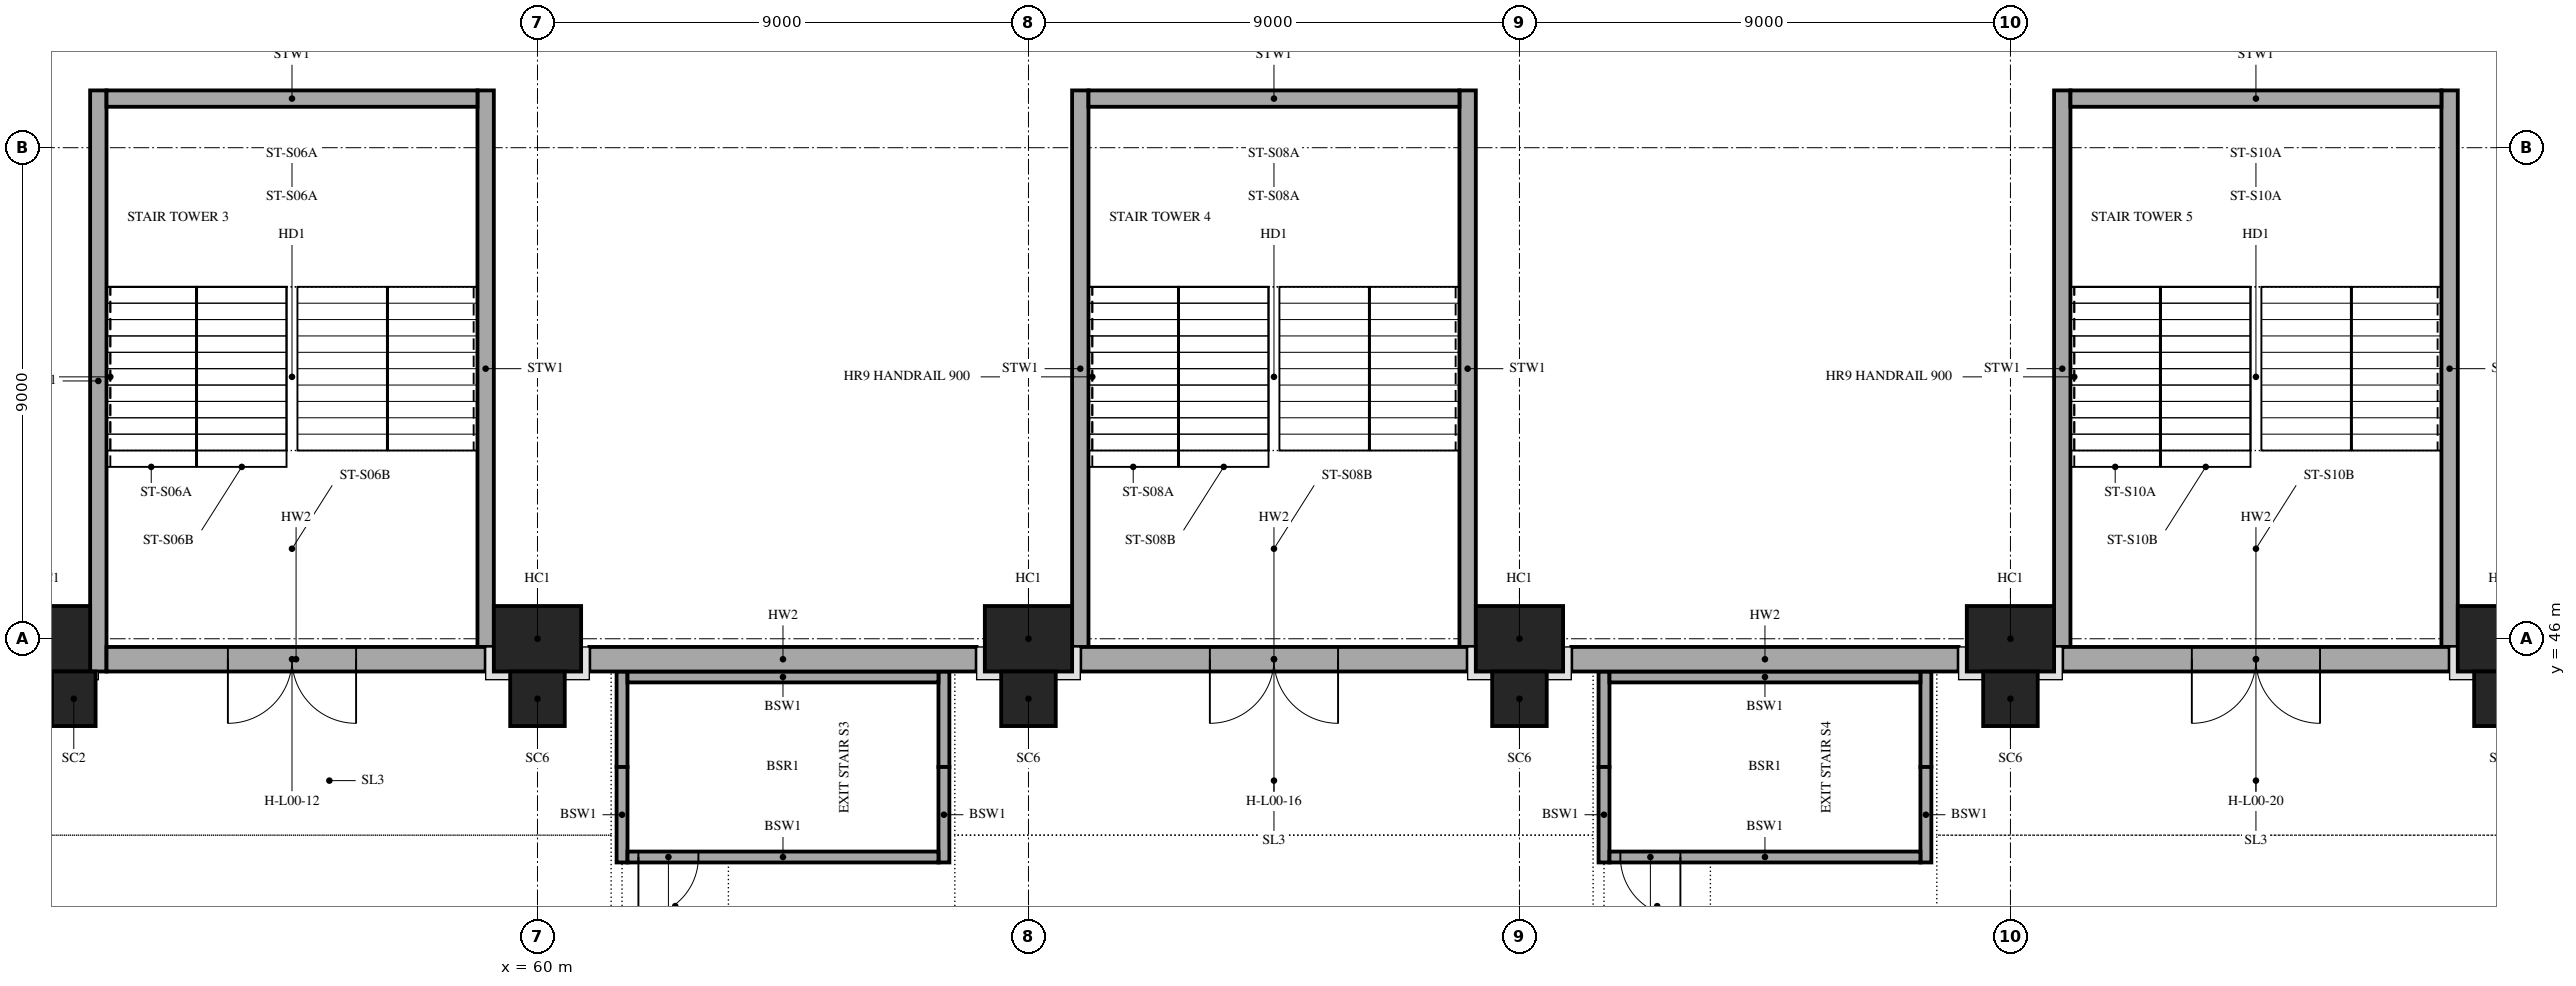
"""IFC4 building model, lengths in metres.
Left out: names, types, materials, properties, quantities, classifications, styles, units other than length and angle.
Written with IfcOpenShell. Run it as: python <this file> out.ifc"""

import sys

from ifc_helpers import new_model, si_unit, direction, frame, frame_2d, origin, origin_2d, place, context, subcontext, project, spatial, rectangle, extrude, element, fill, save


model = new_model("IFC4")
c1 = context("Model", 3, precision=1e-05, world=origin(), true_north=direction((0.0, 1.0)))
c2 = subcontext(c1, "Body", "Model", "MODEL_VIEW")
j1 = project(units=[si_unit("LENGTHUNIT", "METRE"), si_unit("PLANEANGLEUNIT", "RADIAN")], contexts=[c1])
p1 = place(None, origin())
s1 = spatial("IfcSite", under=j1, at=p1, CompositionType="ELEMENT")
p2 = place(p1, origin())
s2 = spatial("IfcBuilding", under=s1, at=p2, CompositionType="ELEMENT")
p3 = place(p2, origin())
s3 = spatial("IfcBuildingStorey", under=s2, at=p3, CompositionType="ELEMENT", Elevation=0.0)
for number, where, z_axis, x_axis in (
    (1, (51.0, 46.0, 0.0), (0.0, 0.0, 1.0), (1.0, 0.0, 0.0)),
    (2, (60.0, 46.0, 0.0), (0.0, 0.0, 1.0), (1.0, 0.0, 0.0)),
    (3, (69.0, 46.0, 0.0), (0.0, 0.0, 1.0), (1.0, 0.0, 0.0)),
    (4, (78.0, 46.0, 0.0), (0.0, 0.0, 1.0), (1.0, 0.0, 0.0)),
    (5, (87.0, 46.0, 0.0), (0.0, 0.0, 1.0), (1.0, 0.0, 0.0)),
    (6, (96.0, 46.0, 0.0), (0.0, 0.0, 1.0), (1.0, 0.0, 0.0)),
):
    element("IfcColumn", number, at=place(p3, frame(where, z_axis=z_axis, x_axis=x_axis)), inside=s3, PredefinedType="COLUMN", context=c2, shape_type="SweptSolid", body=[
        extrude(rectangle(XDim=1.6, YDim=1.2, at=origin_2d()), origin(), (0.0, 0.0, 1.0), 5.0),
    ])
p4 = place(p3, frame((51.95, 45.4, 0.0), z_axis=(0.0, 0.0, 1.0), x_axis=(0.0, 1.0, 0.0)))
e7 = element("IfcWall", 7, at=p4, inside=s3, PredefinedType="SHEAR", context=c2, shape_type="SweptSolid", body=[
    extrude(rectangle(XDim=10.65, YDim=0.3, at=frame_2d((5.325, 0.0))), origin(), (0.0, 0.0, 1.0), 5.0),
])
p5 = place(p3, frame((59.05, 45.85, 0.0), z_axis=(0.0, 0.0, 1.0), x_axis=(0.0, 1.0, 0.0)))
e8 = element("IfcWall", 8, at=p5, inside=s3, PredefinedType="SHEAR", context=c2, shape_type="SweptSolid", body=[
    extrude(rectangle(XDim=10.2, YDim=0.3, at=frame_2d((5.1, 0.0))), origin(), (0.0, 0.0, 1.0), 5.0),
])
p6 = place(p3, frame((52.1, 55.9, 0.0), z_axis=(0.0, 0.0, 1.0), x_axis=(1.0, 0.0, 0.0)))
e9 = element("IfcWall", 9, at=p6, inside=s3, PredefinedType="SHEAR", context=c2, shape_type="SweptSolid", body=[
    extrude(rectangle(XDim=6.8, YDim=0.3, at=frame_2d((3.4, 0.0))), origin(), (0.0, 0.0, 1.0), 5.0),
])
for number, where, z_axis, x_axis in (
    (10, (69.95, 45.85, 0.0), (0.0, 0.0, 1.0), (0.0, 1.0, 0.0)),
    (11, (77.05, 45.85, 0.0), (0.0, 0.0, 1.0), (0.0, 1.0, 0.0)),
):
    element("IfcWall", number, at=place(p3, frame(where, z_axis=z_axis, x_axis=x_axis)), inside=s3, PredefinedType="SHEAR", context=c2, shape_type="SweptSolid", body=[
        extrude(rectangle(XDim=10.2, YDim=0.3, at=frame_2d((5.1, 0.0))), origin(), (0.0, 0.0, 1.0), 5.0),
    ])
p7 = place(p3, frame((70.1, 55.9, 0.0), z_axis=(0.0, 0.0, 1.0), x_axis=(1.0, 0.0, 0.0)))
e12 = element("IfcWall", 12, at=p7, inside=s3, PredefinedType="SHEAR", context=c2, shape_type="SweptSolid", body=[
    extrude(rectangle(XDim=6.8, YDim=0.3, at=frame_2d((3.4, 0.0))), origin(), (0.0, 0.0, 1.0), 5.0),
])
for number, where, z_axis, x_axis in (
    (13, (87.95, 45.85, 0.0), (0.0, 0.0, 1.0), (0.0, 1.0, 0.0)),
    (14, (95.05, 45.85, 0.0), (0.0, 0.0, 1.0), (0.0, 1.0, 0.0)),
):
    element("IfcWall", number, at=place(p3, frame(where, z_axis=z_axis, x_axis=x_axis)), inside=s3, PredefinedType="SHEAR", context=c2, shape_type="SweptSolid", body=[
        extrude(rectangle(XDim=10.2, YDim=0.3, at=frame_2d((5.1, 0.0))), origin(), (0.0, 0.0, 1.0), 5.0),
    ])
p8 = place(p3, frame((88.1, 55.9, 0.0), z_axis=(0.0, 0.0, 1.0), x_axis=(1.0, 0.0, 0.0)))
e15 = element("IfcWall", 15, at=p8, inside=s3, PredefinedType="SHEAR", context=c2, shape_type="SweptSolid", body=[
    extrude(rectangle(XDim=6.8, YDim=0.3, at=frame_2d((3.4, 0.0))), origin(), (0.0, 0.0, 1.0), 5.0),
])
p9 = place(p3, frame((51.5, 44.9, -0.3), z_axis=(0.0, 0.0, 1.0), x_axis=(1.0, 0.0, 0.0)))
e16 = element("IfcColumn", 16, at=p9, inside=s3, PredefinedType="COLUMN", context=c2, shape_type="SweptSolid", body=[
    extrude(rectangle(XDim=0.8, YDim=1.0, at=origin_2d()), origin(), (0.0, 0.0, 1.0), 5.3),
])
for number, where, z_axis, x_axis in (
    (17, (60.0, 44.9, -0.3), (0.0, 0.0, 1.0), (1.0, 0.0, 0.0)),
    (18, (69.0, 44.9, -0.3), (0.0, 0.0, 1.0), (1.0, 0.0, 0.0)),
    (19, (78.0, 44.9, -0.3), (0.0, 0.0, 1.0), (1.0, 0.0, 0.0)),
    (20, (87.0, 44.9, -0.3), (0.0, 0.0, 1.0), (1.0, 0.0, 0.0)),
    (21, (96.0, 44.9, -0.3), (0.0, 0.0, 1.0), (1.0, 0.0, 0.0)),
):
    element("IfcColumn", number, at=place(p3, frame(where, z_axis=z_axis, x_axis=x_axis)), inside=s3, PredefinedType="COLUMN", context=c2, shape_type="SweptSolid", body=[
        extrude(rectangle(XDim=1.0, YDim=1.0, at=origin_2d()), origin(), (0.0, 0.0, 1.0), 5.3),
    ])
for number, where, z_axis, x_axis in (
    (22, (61.55, 45.4, 0.0), (0.0, 0.0, 1.0), (0.0, -1.0, 0.0)),
    (23, (61.55, 43.65, 0.0), (0.0, 0.0, 1.0), (0.0, -1.0, 0.0)),
    (24, (67.45, 45.4, 0.0), (0.0, 0.0, 1.0), (0.0, -1.0, 0.0)),
    (25, (67.45, 43.65, 0.0), (0.0, 0.0, 1.0), (0.0, -1.0, 0.0)),
):
    element("IfcWall", number, at=place(p3, frame(where, z_axis=z_axis, x_axis=x_axis)), inside=s3, PredefinedType="SOLIDWALL", context=c2, shape_type="SweptSolid", body=[
        extrude(rectangle(XDim=1.75, YDim=0.2, at=frame_2d((0.875, 0.0))), origin(), (0.0, 0.0, 1.0), 3.2),
    ])
p10 = place(p3, frame((61.65, 42.0, 0.0), z_axis=(0.0, 0.0, 1.0), x_axis=(1.0, 0.0, 0.0)))
e26 = element("IfcWall", 26, at=p10, inside=s3, PredefinedType="SOLIDWALL", context=c2, shape_type="SweptSolid", body=[
    extrude(rectangle(XDim=5.7, YDim=0.2, at=frame_2d((2.85, 0.0))), origin(), (0.0, 0.0, 1.0), 3.2),
])
p11 = place(p10, frame((0.2, 0.0, 0.0)))
e27 = element("IfcOpeningElement", 27, at=p11, cuts=e26, PredefinedType="OPENING", context=c2, shape_type="SweptSolid", body=[
    extrude(rectangle(XDim=1.1, YDim=2.1, at=frame_2d((0.55, 1.05))), frame((0.0, 0.11, 0.0), z_axis=(0.0, -1.0, 0.0), x_axis=(1.0, 0.0, 0.0)), (0.0, 0.0, 1.0), 0.22),
])
p12 = place(p3, frame((61.65, 45.3, 0.0), z_axis=(0.0, 0.0, 1.0), x_axis=(1.0, 0.0, 0.0)))
e28 = element("IfcWall", 28, at=p12, inside=s3, PredefinedType="SOLIDWALL", context=c2, shape_type="SweptSolid", body=[
    extrude(rectangle(XDim=5.7, YDim=0.2, at=frame_2d((2.85, 0.0))), origin(), (0.0, 0.0, 1.0), 3.2),
])
for number, where, z_axis, x_axis in (
    (29, (79.55, 45.4, 0.0), (0.0, 0.0, 1.0), (0.0, -1.0, 0.0)),
    (30, (79.55, 43.65, 0.0), (0.0, 0.0, 1.0), (0.0, -1.0, 0.0)),
    (31, (85.45, 45.4, 0.0), (0.0, 0.0, 1.0), (0.0, -1.0, 0.0)),
    (32, (85.45, 43.65, 0.0), (0.0, 0.0, 1.0), (0.0, -1.0, 0.0)),
):
    element("IfcWall", number, at=place(p3, frame(where, z_axis=z_axis, x_axis=x_axis)), inside=s3, PredefinedType="SOLIDWALL", context=c2, shape_type="SweptSolid", body=[
        extrude(rectangle(XDim=1.75, YDim=0.2, at=frame_2d((0.875, 0.0))), origin(), (0.0, 0.0, 1.0), 3.2),
    ])
p13 = place(p3, frame((79.65, 42.0, 0.0), z_axis=(0.0, 0.0, 1.0), x_axis=(1.0, 0.0, 0.0)))
e33 = element("IfcWall", 33, at=p13, inside=s3, PredefinedType="SOLIDWALL", context=c2, shape_type="SweptSolid", body=[
    extrude(rectangle(XDim=5.7, YDim=0.2, at=frame_2d((2.85, 0.0))), origin(), (0.0, 0.0, 1.0), 3.2),
])
p14 = place(p13, frame((0.2, 0.0, 0.0)))
e34 = element("IfcOpeningElement", 34, at=p14, cuts=e33, PredefinedType="OPENING", context=c2, shape_type="SweptSolid", body=[
    extrude(rectangle(XDim=1.1, YDim=2.1, at=frame_2d((0.55, 1.05))), frame((0.0, 0.11, 0.0), z_axis=(0.0, -1.0, 0.0), x_axis=(1.0, 0.0, 0.0)), (0.0, 0.0, 1.0), 0.22),
])
p15 = place(p3, frame((79.65, 45.3, 0.0), z_axis=(0.0, 0.0, 1.0), x_axis=(1.0, 0.0, 0.0)))
e35 = element("IfcWall", 35, at=p15, inside=s3, PredefinedType="SOLIDWALL", context=c2, shape_type="SweptSolid", body=[
    extrude(rectangle(XDim=5.7, YDim=0.2, at=frame_2d((2.85, 0.0))), origin(), (0.0, 0.0, 1.0), 3.2),
])
p16 = place(p3, frame((52.1, 45.625, 0.0), z_axis=(0.0, 0.0, 1.0), x_axis=(1.0, 0.0, 0.0)))
e36 = element("IfcWall", 36, at=p16, inside=s3, PredefinedType="SOLIDWALL", context=c2, shape_type="SweptSolid", body=[
    extrude(rectangle(XDim=6.95, YDim=0.45, at=frame_2d((3.475, 0.0))), origin(), (0.0, 0.0, 1.0), 5.0),
])
p17 = place(p16, frame((2.225, 0.0, 0.0)))
e37 = element("IfcOpeningElement", 37, at=p17, cuts=e36, PredefinedType="OPENING", context=c2, shape_type="SweptSolid", body=[
    extrude(rectangle(XDim=2.35, YDim=2.1, at=frame_2d((1.175, 1.05))), frame((0.0, 0.235, 0.0), z_axis=(0.0, -1.0, 0.0), x_axis=(1.0, 0.0, 0.0)), (0.0, 0.0, 1.0), 0.47),
])
p18 = place(p3, frame((60.95, 45.625, 0.0), z_axis=(0.0, 0.0, 1.0), x_axis=(1.0, 0.0, 0.0)))
e38 = element("IfcWall", 38, at=p18, inside=s3, PredefinedType="SOLIDWALL", context=c2, shape_type="SweptSolid", body=[
    extrude(rectangle(XDim=7.1, YDim=0.45, at=frame_2d((3.55, 0.0))), origin(), (0.0, 0.0, 1.0), 5.0),
])
p19 = place(p3, frame((69.95, 45.625, 0.0), z_axis=(0.0, 0.0, 1.0), x_axis=(1.0, 0.0, 0.0)))
e39 = element("IfcWall", 39, at=p19, inside=s3, PredefinedType="SOLIDWALL", context=c2, shape_type="SweptSolid", body=[
    extrude(rectangle(XDim=7.1, YDim=0.45, at=frame_2d((3.55, 0.0))), origin(), (0.0, 0.0, 1.0), 5.0),
])
p20 = place(p19, frame((2.375, 0.0, 0.0)))
e40 = element("IfcOpeningElement", 40, at=p20, cuts=e39, PredefinedType="OPENING", context=c2, shape_type="SweptSolid", body=[
    extrude(rectangle(XDim=2.35, YDim=2.1, at=frame_2d((1.175, 1.05))), frame((0.0, 0.235, 0.0), z_axis=(0.0, -1.0, 0.0), x_axis=(1.0, 0.0, 0.0)), (0.0, 0.0, 1.0), 0.47),
])
p21 = place(p3, frame((78.95, 45.625, 0.0), z_axis=(0.0, 0.0, 1.0), x_axis=(1.0, 0.0, 0.0)))
e41 = element("IfcWall", 41, at=p21, inside=s3, PredefinedType="SOLIDWALL", context=c2, shape_type="SweptSolid", body=[
    extrude(rectangle(XDim=7.1, YDim=0.45, at=frame_2d((3.55, 0.0))), origin(), (0.0, 0.0, 1.0), 5.0),
])
p22 = place(p3, frame((87.95, 45.625, 0.0), z_axis=(0.0, 0.0, 1.0), x_axis=(1.0, 0.0, 0.0)))
e42 = element("IfcWall", 42, at=p22, inside=s3, PredefinedType="SOLIDWALL", context=c2, shape_type="SweptSolid", body=[
    extrude(rectangle(XDim=7.1, YDim=0.45, at=frame_2d((3.55, 0.0))), origin(), (0.0, 0.0, 1.0), 5.0),
])
p23 = place(p22, frame((2.375, 0.0, 0.0)))
e43 = element("IfcOpeningElement", 43, at=p23, cuts=e42, PredefinedType="OPENING", context=c2, shape_type="SweptSolid", body=[
    extrude(rectangle(XDim=2.35, YDim=2.1, at=frame_2d((1.175, 1.05))), frame((0.0, 0.235, 0.0), z_axis=(0.0, -1.0, 0.0), x_axis=(1.0, 0.0, 0.0)), (0.0, 0.0, 1.0), 0.47),
])
p24 = place(p11, frame((1.1, 0.0, 0.0), z_axis=(0.0, 0.0, 1.0), x_axis=(-1.0, 0.0, 0.0)))
e44 = element("IfcDoor", 44, at=p24, inside=s3, OperationType="SINGLE_SWING_RIGHT", PredefinedType="DOOR", context=c2, shape_type="SweptSolid", body=[
    extrude(rectangle(XDim=1.1, YDim=2.1, at=frame_2d((0.55, 1.05))), frame((0.0, 0.025, 0.0), z_axis=(0.0, -1.0, 0.0), x_axis=(1.0, 0.0, 0.0)), (0.0, 0.0, 1.0), 0.05),
])
fill(e27, e44)
p25 = place(p14, frame((1.1, 0.0, 0.0), z_axis=(0.0, 0.0, 1.0), x_axis=(-1.0, 0.0, 0.0)))
e45 = element("IfcDoor", 45, at=p25, inside=s3, OperationType="SINGLE_SWING_LEFT", PredefinedType="DOOR", context=c2, shape_type="SweptSolid", body=[
    extrude(rectangle(XDim=1.1, YDim=2.1, at=frame_2d((0.55, 1.05))), frame((0.0, 0.025, 0.0), z_axis=(0.0, -1.0, 0.0), x_axis=(1.0, 0.0, 0.0)), (0.0, 0.0, 1.0), 0.05),
])
fill(e34, e45)
p26 = place(p17, frame((2.35, 0.0, 0.0), z_axis=(0.0, 0.0, 1.0), x_axis=(-1.0, 0.0, 0.0)))
e46 = element("IfcDoor", 46, at=p26, inside=s3, OperationType="DOUBLE_DOOR_SINGLE_SWING", PredefinedType="DOOR", context=c2, shape_type="SweptSolid", body=[
    extrude(rectangle(XDim=2.35, YDim=2.1, at=frame_2d((1.175, 1.05))), frame((0.0, 0.025, 0.0), z_axis=(0.0, -1.0, 0.0), x_axis=(1.0, 0.0, 0.0)), (0.0, 0.0, 1.0), 0.05),
])
fill(e37, e46)
p27 = place(p20, frame((2.35, 0.0, 0.0), z_axis=(0.0, 0.0, 1.0), x_axis=(-1.0, 0.0, 0.0)))
e47 = element("IfcDoor", 47, at=p27, inside=s3, OperationType="DOUBLE_DOOR_SINGLE_SWING", PredefinedType="DOOR", context=c2, shape_type="SweptSolid", body=[
    extrude(rectangle(XDim=2.35, YDim=2.1, at=frame_2d((1.175, 1.05))), frame((0.0, 0.025, 0.0), z_axis=(0.0, -1.0, 0.0), x_axis=(1.0, 0.0, 0.0)), (0.0, 0.0, 1.0), 0.05),
])
fill(e40, e47)
p28 = place(p23, frame((2.35, 0.0, 0.0), z_axis=(0.0, 0.0, 1.0), x_axis=(-1.0, 0.0, 0.0)))
e48 = element("IfcDoor", 48, at=p28, inside=s3, OperationType="DOUBLE_DOOR_SINGLE_SWING", PredefinedType="DOOR", context=c2, shape_type="SweptSolid", body=[
    extrude(rectangle(XDim=2.35, YDim=2.1, at=frame_2d((1.175, 1.05))), frame((0.0, 0.025, 0.0), z_axis=(0.0, -1.0, 0.0), x_axis=(1.0, 0.0, 0.0)), (0.0, 0.0, 1.0), 0.05),
])
fill(e43, e48)
save(model, sys.argv[1])
